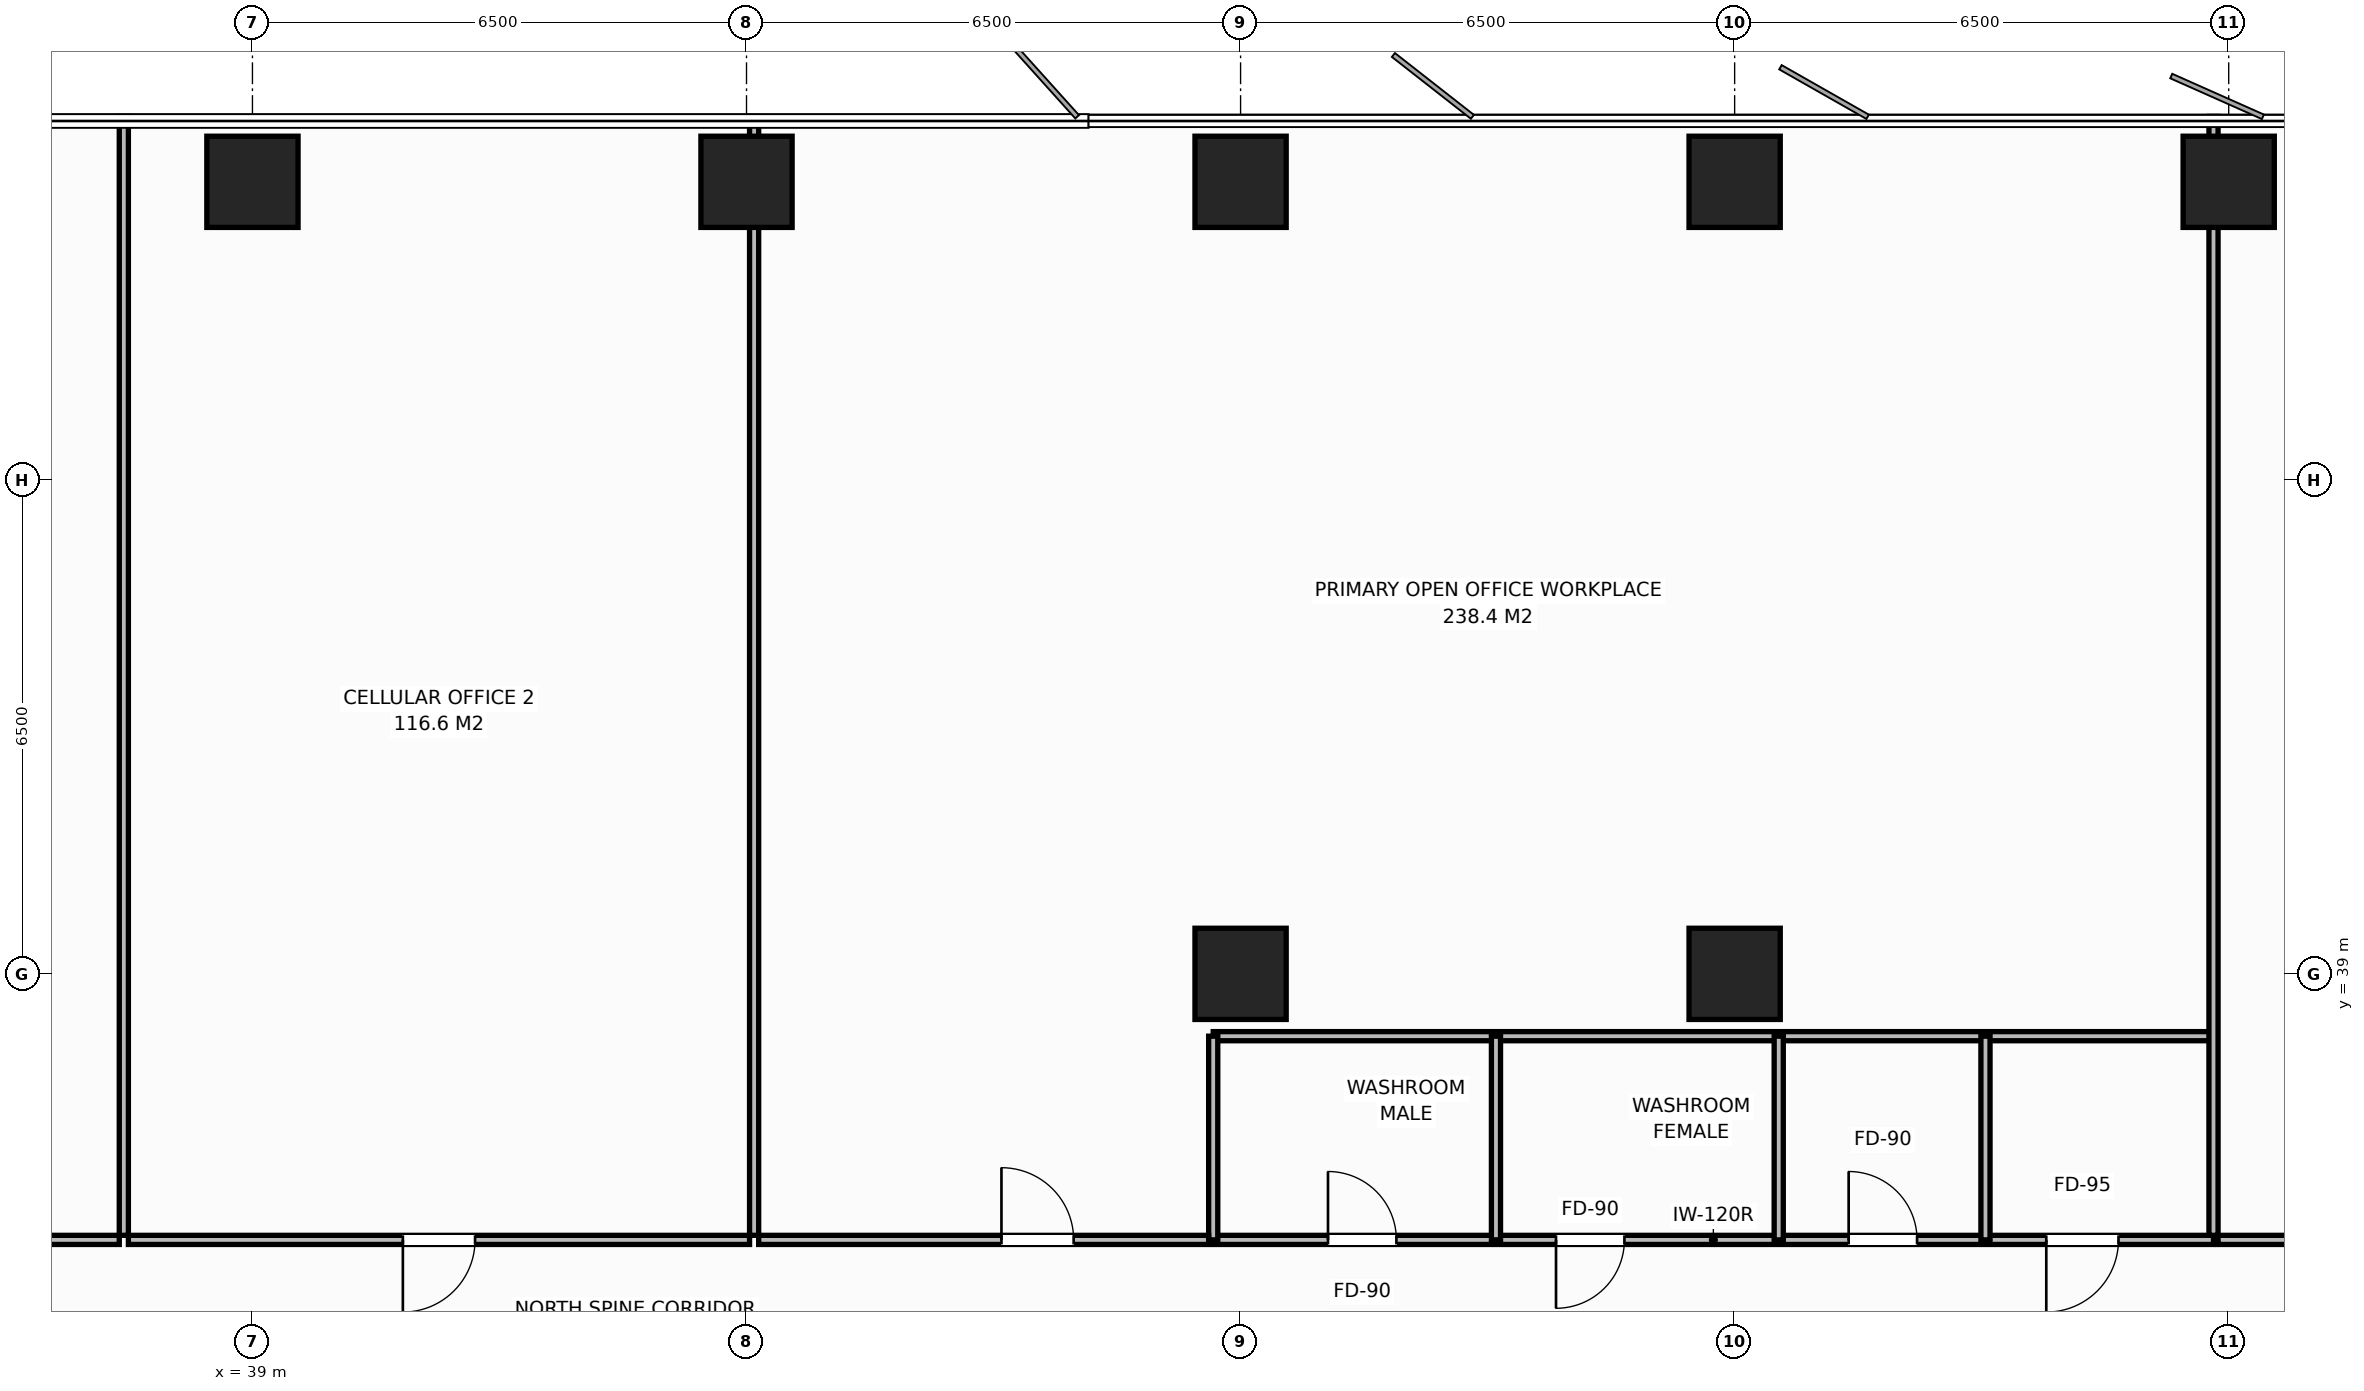
"""IFC4 building model, lengths in metres.
Left out: names, types, materials, properties, quantities, classifications, styles, units other than length and angle.
Written with IfcOpenShell. Run it as: python <this file> out.ifc"""

import sys

from ifc_helpers import new_model, si_unit, direction, frame, frame_2d, origin, origin_2d, place, context, subcontext, project, spatial, rectangle, extrude, element, fill, save


model = new_model("IFC4")
c1 = context("Model", 3, precision=1e-05, world=origin(), true_north=direction((0.0, 1.0)))
c2 = subcontext(c1, "Body", "Model", "MODEL_VIEW")
j1 = project(units=[si_unit("LENGTHUNIT", "METRE"), si_unit("PLANEANGLEUNIT", "RADIAN")], contexts=[c1])
p1 = place(None, origin())
s1 = spatial("IfcSite", under=j1, at=p1, CompositionType="ELEMENT")
p2 = place(p1, origin())
s2 = spatial("IfcBuilding", under=s1, at=p2, CompositionType="ELEMENT")
p3 = place(p2, frame((0.0, 0.0, 131.6)))
s3 = spatial("IfcBuildingStorey", under=s2, at=p3, CompositionType="ELEMENT", Elevation=131.6)
for number, where, z_axis, x_axis in (
    (1, (58.5, 39.0, 0.0), (0.0, 0.0, 1.0), (1.0, 0.0, 0.0)),
    (2, (52.0, 39.0, 0.0), (0.0, 0.0, 1.0), (1.0, 0.0, 0.0)),
    (3, (39.0, 49.42, 0.0), (0.0, 0.0, 1.0), (1.0, 0.0, 0.0)),
    (4, (45.5, 49.42, 0.0), (0.0, 0.0, 1.0), (1.0, 0.0, 0.0)),
    (5, (52.0, 49.42, 0.0), (0.0, 0.0, 1.0), (1.0, 0.0, 0.0)),
    (6, (58.5, 49.42, 0.0), (0.0, 0.0, 1.0), (1.0, 0.0, 0.0)),
    (7, (65.0, 49.42, 0.0), (0.0, 0.0, 1.0), (1.0, 0.0, 0.0)),
):
    element("IfcColumn", number, at=place(p3, frame(where, z_axis=z_axis, x_axis=x_axis)), inside=s3, PredefinedType="COLUMN", context=c2, shape_type="SweptSolid", body=[
        extrude(rectangle(XDim=1.2, YDim=1.2, at=origin_2d()), origin(), (0.0, 0.0, 1.0), 3.8),
    ])
p4 = place(p3, frame((51.64, 35.5, 0.0), z_axis=(0.0, 0.0, 1.0), x_axis=(1.0, 0.0, 0.0)))
e8 = element("IfcWall", 8, at=p4, inside=s3, PredefinedType="PARTITIONING", context=c2, shape_type="SweptSolid", body=[
    extrude(rectangle(XDim=13.16, YDim=0.12, at=frame_2d((6.58, 0.0))), origin(), (0.0, 0.0, 1.0), 3.565),
])
p5 = place(p4, frame((1.51, 0.0, 0.0)))
e9 = element("IfcOpeningElement", 9, at=p5, cuts=e8, PredefinedType="OPENING", context=c2, shape_type="SweptSolid", body=[
    extrude(rectangle(XDim=0.9, YDim=2.15, at=frame_2d((0.45, 1.075))), frame((0.0, 0.07, 0.0), z_axis=(0.0, -1.0, 0.0), x_axis=(1.0, 0.0, 0.0)), (0.0, 0.0, 1.0), 0.14),
])
p6 = place(p4, frame((4.51, 0.0, 0.0)))
e10 = element("IfcOpeningElement", 10, at=p6, cuts=e8, PredefinedType="OPENING", context=c2, shape_type="SweptSolid", body=[
    extrude(rectangle(XDim=0.9, YDim=2.15, at=frame_2d((0.45, 1.075))), frame((0.0, 0.07, 0.0), z_axis=(0.0, -1.0, 0.0), x_axis=(1.0, 0.0, 0.0)), (0.0, 0.0, 1.0), 0.14),
])
p7 = place(p4, frame((8.36, 0.0, 0.0)))
e11 = element("IfcOpeningElement", 11, at=p7, cuts=e8, PredefinedType="OPENING", context=c2, shape_type="SweptSolid", body=[
    extrude(rectangle(XDim=0.9, YDim=2.15, at=frame_2d((0.45, 1.075))), frame((0.0, 0.07, 0.0), z_axis=(0.0, -1.0, 0.0), x_axis=(1.0, 0.0, 0.0)), (0.0, 0.0, 1.0), 0.14),
])
p8 = place(p4, frame((10.96, 0.0, 0.0)))
e12 = element("IfcOpeningElement", 12, at=p8, cuts=e8, PredefinedType="OPENING", context=c2, shape_type="SweptSolid", body=[
    extrude(rectangle(XDim=0.95, YDim=2.15, at=frame_2d((0.475, 1.075))), frame((0.0, 0.07, 0.0), z_axis=(0.0, -1.0, 0.0), x_axis=(1.0, 0.0, 0.0)), (0.0, 0.0, 1.0), 0.14),
])
p9 = place(p3, frame((51.64, 38.18, 0.0), z_axis=(0.0, 0.0, 1.0), x_axis=(1.0, 0.0, 0.0)))
e13 = element("IfcWall", 13, at=p9, inside=s3, PredefinedType="PARTITIONING", context=c2, shape_type="SweptSolid", body=[
    extrude(rectangle(XDim=13.16, YDim=0.12, at=frame_2d((6.58, 0.0))), origin(), (0.0, 0.0, 1.0), 3.565),
])
for number, where, z_axis, x_axis in (
    (14, (51.64, 35.5, 0.0), (0.0, 0.0, 1.0), (0.0, 1.0, 0.0)),
    (15, (55.36, 35.5, 0.0), (0.0, 0.0, 1.0), (0.0, 1.0, 0.0)),
    (16, (59.08, 35.5, 0.0), (0.0, 0.0, 1.0), (0.0, 1.0, 0.0)),
    (17, (61.8, 35.5, 0.0), (0.0, 0.0, 1.0), (0.0, 1.0, 0.0)),
):
    element("IfcWall", number, at=place(p3, frame(where, z_axis=z_axis, x_axis=x_axis)), inside=s3, PredefinedType="PARTITIONING", context=c2, shape_type="SweptSolid", body=[
        extrude(rectangle(XDim=2.68, YDim=0.12, at=frame_2d((1.34, 0.0))), origin(), (0.0, 0.0, 1.0), 3.565),
    ])
p10 = place(p3, frame((37.308, 35.56, 0.0), z_axis=(0.0, 0.0, 1.0), x_axis=(0.0, 1.0, 0.0)))
e18 = element("IfcWall", 18, at=p10, inside=s3, PredefinedType="PARTITIONING", context=c2, shape_type="SweptSolid", body=[
    extrude(rectangle(XDim=14.72, YDim=0.12, at=frame_2d((7.36, 0.0))), origin(), (0.0, 0.0, 1.0), 3.565),
])
p11 = place(p3, frame((31.494, 35.5, 0.0), z_axis=(0.0, 0.0, 1.0), x_axis=(1.0, 0.0, 0.0)))
e19 = element("IfcWall", 19, at=p11, inside=s3, PredefinedType="PARTITIONING", context=c2, shape_type="SweptSolid", body=[
    extrude(rectangle(XDim=5.753, YDim=0.12, at=frame_2d((2.877, 0.0))), origin(), (0.0, 0.0, 1.0), 3.565),
])
p12 = place(p11, frame((2.402, 0.0, 0.0)))
e20 = element("IfcOpeningElement", 20, at=p12, cuts=e19, PredefinedType="OPENING", context=c2, shape_type="SweptSolid", body=[
    extrude(rectangle(XDim=0.95, YDim=2.15, at=frame_2d((0.475, 1.075))), frame((0.0, 0.07, 0.0), z_axis=(0.0, -1.0, 0.0), x_axis=(1.0, 0.0, 0.0)), (0.0, 0.0, 1.0), 0.14),
])
p13 = place(p3, frame((45.6, 35.56, 0.0), z_axis=(0.0, 0.0, 1.0), x_axis=(0.0, 1.0, 0.0)))
e21 = element("IfcWall", 21, at=p13, inside=s3, PredefinedType="PARTITIONING", context=c2, shape_type="SweptSolid", body=[
    extrude(rectangle(XDim=14.72, YDim=0.12, at=frame_2d((7.36, 0.0))), origin(), (0.0, 0.0, 1.0), 2.965),
])
p14 = place(p3, frame((37.368, 35.5, 0.0), z_axis=(0.0, 0.0, 1.0), x_axis=(1.0, 0.0, 0.0)))
e22 = element("IfcWall", 22, at=p14, inside=s3, PredefinedType="PARTITIONING", context=c2, shape_type="SweptSolid", body=[
    extrude(rectangle(XDim=8.172, YDim=0.12, at=frame_2d((4.086, 0.0))), origin(), (0.0, 0.0, 1.0), 3.565),
])
p15 = place(p14, frame((3.611, 0.0, 0.0)))
e23 = element("IfcOpeningElement", 23, at=p15, cuts=e22, PredefinedType="OPENING", context=c2, shape_type="SweptSolid", body=[
    extrude(rectangle(XDim=0.95, YDim=2.15, at=frame_2d((0.475, 1.075))), frame((0.0, 0.07, 0.0), z_axis=(0.0, -1.0, 0.0), x_axis=(1.0, 0.0, 0.0)), (0.0, 0.0, 1.0), 0.14),
])
p16 = place(p3, frame((64.8, 35.56, 0.0), z_axis=(0.0, 0.0, 1.0), x_axis=(0.0, 1.0, 0.0)))
e24 = element("IfcWall", 24, at=p16, inside=s3, PredefinedType="PARTITIONING", context=c2, shape_type="SweptSolid", body=[
    extrude(rectangle(XDim=14.72, YDim=0.12, at=frame_2d((7.36, 0.0))), origin(), (0.0, 0.0, 1.0), 2.965),
])
p17 = place(p3, frame((45.66, 35.5, 0.0), z_axis=(0.0, 0.0, 1.0), x_axis=(1.0, 0.0, 0.0)))
e25 = element("IfcWall", 25, at=p17, inside=s3, PredefinedType="PARTITIONING", context=c2, shape_type="SweptSolid", body=[
    extrude(rectangle(XDim=5.92, YDim=0.12, at=frame_2d((2.96, 0.0))), origin(), (0.0, 0.0, 1.0), 3.565),
])
p18 = place(p17, frame((3.194, 0.0, 0.0)))
e26 = element("IfcOpeningElement", 26, at=p18, cuts=e25, PredefinedType="OPENING", context=c2, shape_type="SweptSolid", body=[
    extrude(rectangle(XDim=0.95, YDim=2.15, at=frame_2d((0.475, 1.075))), frame((0.0, 0.07, 0.0), z_axis=(0.0, -1.0, 0.0), x_axis=(1.0, 0.0, 0.0)), (0.0, 0.0, 1.0), 0.14),
])
p19 = place(p3, frame((64.86, 35.5, 0.0), z_axis=(0.0, 0.0, 1.0), x_axis=(1.0, 0.0, 0.0)))
e27 = element("IfcWall", 27, at=p19, inside=s3, PredefinedType="PARTITIONING", context=c2, shape_type="SweptSolid", body=[
    extrude(rectangle(XDim=11.16, YDim=0.12, at=frame_2d((5.58, 0.0))), origin(), (0.0, 0.0, 1.0), 3.565),
])
p20 = place(p19, frame((1.31, 0.0, 0.0)))
e28 = element("IfcOpeningElement", 28, at=p20, cuts=e27, PredefinedType="OPENING", context=c2, shape_type="SweptSolid", body=[
    extrude(rectangle(XDim=0.95, YDim=2.15, at=frame_2d((0.475, 1.075))), frame((0.0, 0.07, 0.0), z_axis=(0.0, -1.0, 0.0), x_axis=(1.0, 0.0, 0.0)), (0.0, 0.0, 1.0), 0.14),
])
p21 = place(p5, origin())
e29 = element("IfcDoor", 29, at=p21, inside=s3, OperationType="SINGLE_SWING_LEFT", PredefinedType="DOOR", context=c2, shape_type="SweptSolid", body=[
    extrude(rectangle(XDim=0.9, YDim=2.15, at=frame_2d((0.45, 1.075))), frame((0.0, 0.025, 0.0), z_axis=(0.0, -1.0, 0.0), x_axis=(1.0, 0.0, 0.0)), (0.0, 0.0, 1.0), 0.05),
])
fill(e9, e29)
p22 = place(p6, origin())
e30 = element("IfcDoor", 30, at=p22, inside=s3, OperationType="SINGLE_SWING_RIGHT", PredefinedType="DOOR", context=c2, shape_type="SweptSolid", body=[
    extrude(rectangle(XDim=0.9, YDim=2.15, at=frame_2d((0.45, 1.075))), frame((0.0, 0.025, 0.0), z_axis=(0.0, -1.0, 0.0), x_axis=(1.0, 0.0, 0.0)), (0.0, 0.0, 1.0), 0.05),
])
fill(e10, e30)
p23 = place(p7, origin())
e31 = element("IfcDoor", 31, at=p23, inside=s3, OperationType="SINGLE_SWING_LEFT", PredefinedType="DOOR", context=c2, shape_type="SweptSolid", body=[
    extrude(rectangle(XDim=0.9, YDim=2.15, at=frame_2d((0.45, 1.075))), frame((0.0, 0.025, 0.0), z_axis=(0.0, -1.0, 0.0), x_axis=(1.0, 0.0, 0.0)), (0.0, 0.0, 1.0), 0.05),
])
fill(e11, e31)
p24 = place(p8, origin())
e32 = element("IfcDoor", 32, at=p24, inside=s3, OperationType="SINGLE_SWING_RIGHT", PredefinedType="DOOR", context=c2, shape_type="SweptSolid", body=[
    extrude(rectangle(XDim=0.95, YDim=2.15, at=frame_2d((0.475, 1.075))), frame((0.0, 0.025, 0.0), z_axis=(0.0, -1.0, 0.0), x_axis=(1.0, 0.0, 0.0)), (0.0, 0.0, 1.0), 0.05),
])
fill(e12, e32)
p25 = place(p15, origin())
e33 = element("IfcDoor", 33, at=p25, inside=s3, OperationType="SINGLE_SWING_RIGHT", PredefinedType="DOOR", context=c2, shape_type="SweptSolid", body=[
    extrude(rectangle(XDim=0.95, YDim=2.15, at=frame_2d((0.475, 1.075))), frame((0.0, 0.025, 0.0), z_axis=(0.0, -1.0, 0.0), x_axis=(1.0, 0.0, 0.0)), (0.0, 0.0, 1.0), 0.05),
])
fill(e23, e33)
p26 = place(p18, origin())
e34 = element("IfcDoor", 34, at=p26, inside=s3, OperationType="SINGLE_SWING_LEFT", PredefinedType="DOOR", context=c2, shape_type="SweptSolid", body=[
    extrude(rectangle(XDim=0.95, YDim=2.15, at=frame_2d((0.475, 1.075))), frame((0.0, 0.025, 0.0), z_axis=(0.0, -1.0, 0.0), x_axis=(1.0, 0.0, 0.0)), (0.0, 0.0, 1.0), 0.05),
])
fill(e26, e34)
save(model, sys.argv[1])
